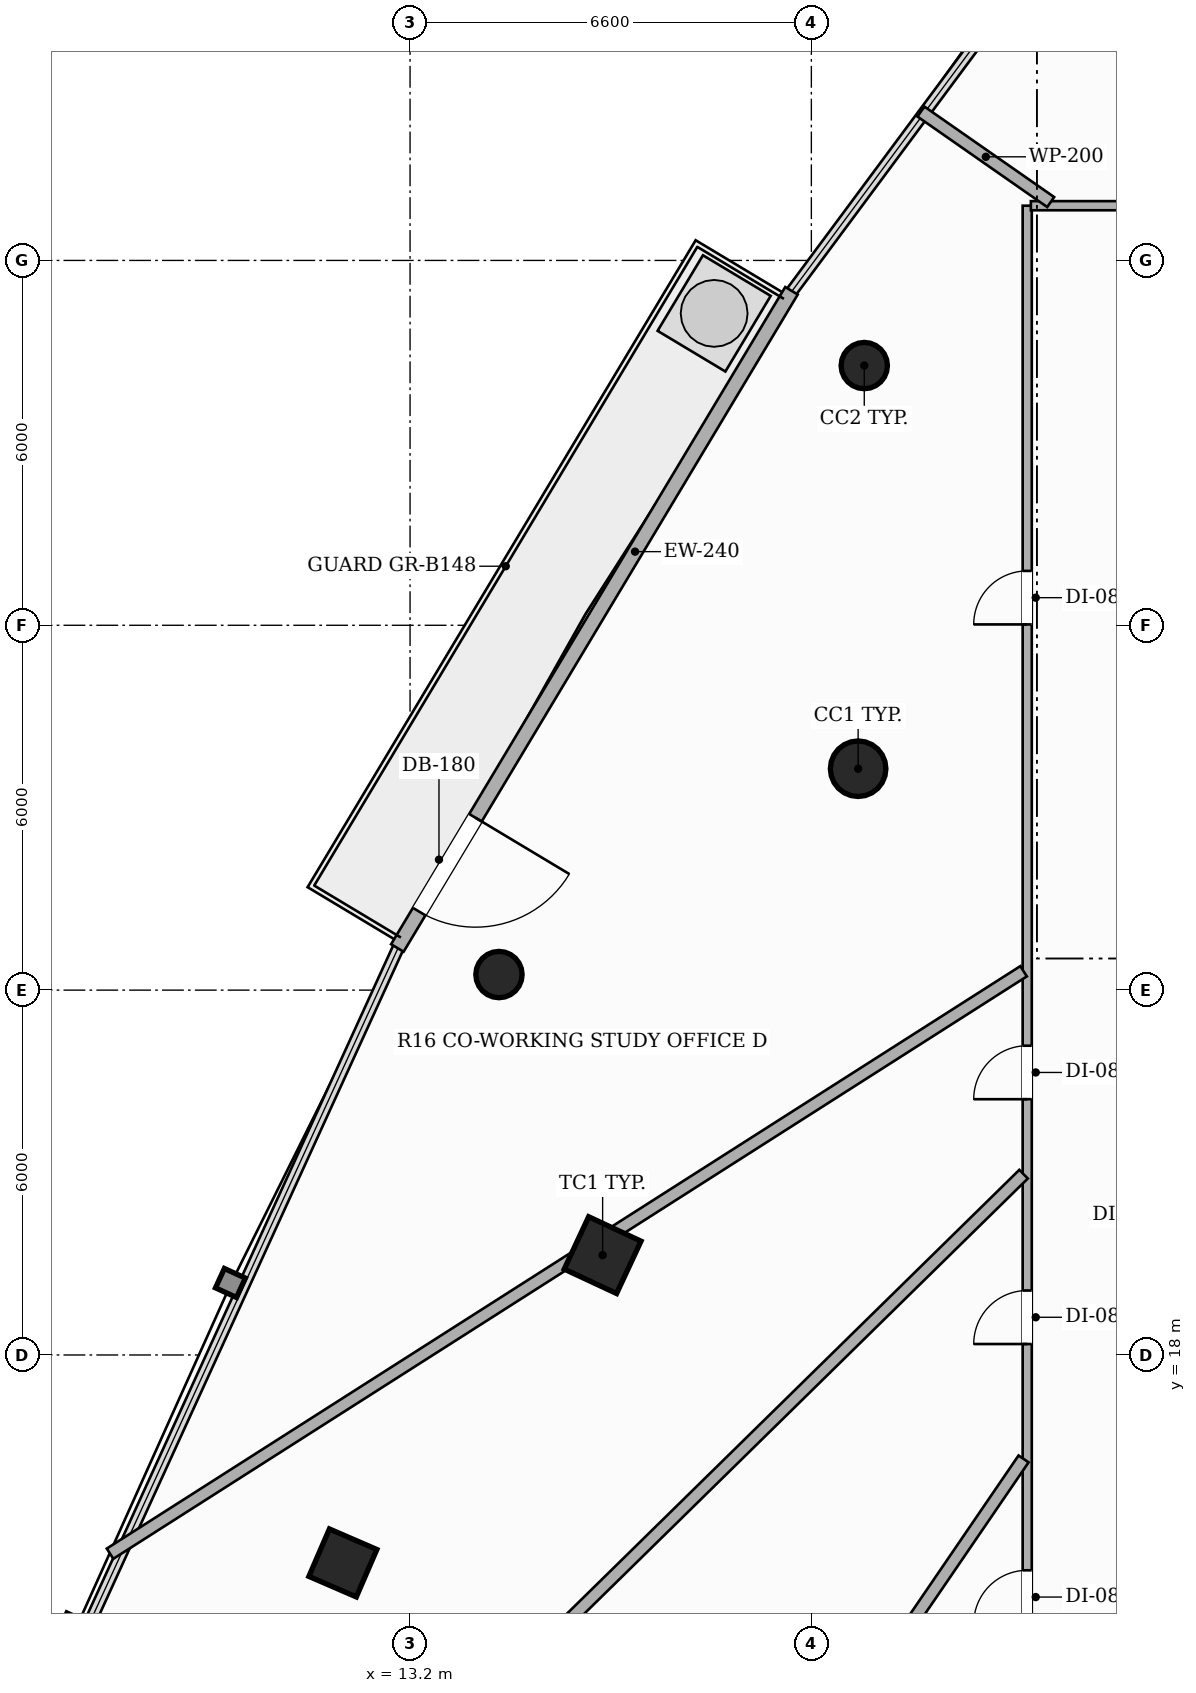
"""IFC4 building model, lengths in metres.
Left out: names, types, materials, properties, quantities, classifications, styles, units other than length and angle.
Written with IfcOpenShell. Run it as: python <this file> out.ifc"""

import sys

from ifc_helpers import new_model, si_unit, direction, frame, frame_2d, origin, origin_2d, place, context, subcontext, project, spatial, rectangle, hollow_rectangle, hollow_circle, extrude, element, fill, save


model = new_model("IFC4")
c1 = context("Model", 3, precision=1e-05, world=origin(), true_north=direction((0.0, 1.0)))
c2 = subcontext(c1, "Body", "Model", "MODEL_VIEW")
j1 = project(units=[si_unit("LENGTHUNIT", "METRE"), si_unit("PLANEANGLEUNIT", "RADIAN")], contexts=[c1])
p1 = place(None, origin())
s1 = spatial("IfcSite", under=j1, at=p1, CompositionType="ELEMENT")
p2 = place(p1, origin())
s2 = spatial("IfcBuilding", under=s1, at=p2, CompositionType="ELEMENT")
p3 = place(p2, frame((0.0, 0.0, 64.25)))
s3 = spatial("IfcBuildingStorey", under=s2, at=p3, CompositionType="ELEMENT", Elevation=64.25)
p4 = place(p3, frame((20.569, 27.641, 0.0), z_axis=(0.0, 0.0, 1.0), x_axis=(1.0, 0.0, 0.0)))
e1 = element("IfcColumn", 1, at=p4, inside=s3, PredefinedType="COLUMN", context=c2, shape_type="SweptSolid", body=[
    extrude(hollow_circle(Radius=0.457, WallThickness=0.025, at=origin_2d()), origin(), (0.0, 0.0, 1.0), 3.3),
])
p5 = place(p3, frame((16.367, 19.642, 0.0), z_axis=(0.0, 0.0, 1.0), x_axis=(0.422618261741, 0.906307787037, 0.0)))
e2 = element("IfcColumn", 2, at=p5, inside=s3, PredefinedType="COLUMN", context=c2, shape_type="SweptSolid", body=[
    extrude(hollow_rectangle(XDim=0.95, YDim=0.95, WallThickness=0.032, at=origin_2d()), origin(), (0.0, 0.0, 1.0), 3.3),
])
p6 = place(p3, frame((12.095, 14.58, 0.0), z_axis=(0.0, 0.0, 1.0), x_axis=(0.397147890635, 0.917754625684, 0.0)))
e3 = element("IfcColumn", 3, at=p6, inside=s3, PredefinedType="COLUMN", context=c2, shape_type="SweptSolid", body=[
    extrude(hollow_rectangle(XDim=0.85, YDim=0.85, WallThickness=0.028, at=origin_2d()), origin(), (0.0, 0.0, 1.0), 3.3),
])
for number, where, z_axis, x_axis in (
    (4, (20.67, 34.271, 0.0), (0.0, 0.0, 1.0), (1.0, 0.0, 0.0)),
    (5, (14.662, 24.256, 0.0), (0.0, 0.0, 1.0), (1.0, 0.0, 0.0)),
):
    element("IfcColumn", number, at=place(p3, frame(where, z_axis=z_axis, x_axis=x_axis)), inside=s3, PredefinedType="COLUMN", context=c2, shape_type="SweptSolid", body=[
        extrude(hollow_circle(Radius=0.381, WallThickness=0.022, at=origin_2d()), origin(), (0.0, 0.0, 1.0), 3.3),
    ])
p7 = place(p3, frame((19.473, 35.501, 0.0), z_axis=(0.0, 0.0, 1.0), x_axis=(-0.514333361126, -0.857590341382, 0.0)))
e6 = element("IfcWall", 6, at=p7, inside=s3, PredefinedType="SOLIDWALL", context=c2, shape_type="SweptSolid", body=[
    extrude(rectangle(XDim=12.603, YDim=0.24, at=frame_2d((6.301, 0.0))), origin(), (0.0, 0.0, 1.0), 2.624),
])
p8 = place(p7, frame((10.105, 0.0, 0.0)))
e7 = element("IfcOpeningElement", 7, at=p8, cuts=e6, PredefinedType="OPENING", context=c2, shape_type="SweptSolid", body=[
    extrude(rectangle(XDim=1.8, YDim=2.2, at=frame_2d((0.9, 1.1))), frame((0.0, 0.13, 0.0), z_axis=(0.0, -1.0, 0.0), x_axis=(1.0, 0.0, 0.0)), (0.0, 0.0, 1.0), 0.26),
])
p9 = place(p3, frame((23.35, 11.86, 0.0), z_axis=(0.0, 0.0, 1.0), x_axis=(0.0, 1.0, 0.0)))
e8 = element("IfcWall", 8, at=p9, inside=s3, PredefinedType="PARTITIONING", context=c2, shape_type="SweptSolid", body=[
    extrude(rectangle(XDim=25.04, YDim=0.15, at=frame_2d((12.52, 0.0))), origin(), (0.0, 0.0, 1.0), 2.413),
])
p10 = place(p9, frame((18.154, 0.0, 0.0)))
e9 = element("IfcOpeningElement", 9, at=p10, cuts=e8, PredefinedType="OPENING", context=c2, shape_type="SweptSolid", body=[
    extrude(rectangle(XDim=0.88, YDim=2.1, at=frame_2d((0.44, 1.05))), frame((0.0, 0.085, 0.0), z_axis=(0.0, -1.0, 0.0), x_axis=(1.0, 0.0, 0.0)), (0.0, 0.0, 1.0), 0.17),
])
p11 = place(p9, frame((10.346, 0.0, 0.0)))
e10 = element("IfcOpeningElement", 10, at=p11, cuts=e8, PredefinedType="OPENING", context=c2, shape_type="SweptSolid", body=[
    extrude(rectangle(XDim=0.88, YDim=2.1, at=frame_2d((0.44, 1.05))), frame((0.0, 0.085, 0.0), z_axis=(0.0, -1.0, 0.0), x_axis=(1.0, 0.0, 0.0)), (0.0, 0.0, 1.0), 0.17),
])
p12 = place(p9, frame((6.32, 0.0, 0.0)))
e11 = element("IfcOpeningElement", 11, at=p12, cuts=e8, PredefinedType="OPENING", context=c2, shape_type="SweptSolid", body=[
    extrude(rectangle(XDim=0.88, YDim=2.1, at=frame_2d((0.44, 1.05))), frame((0.0, 0.085, 0.0), z_axis=(0.0, -1.0, 0.0), x_axis=(1.0, 0.0, 0.0)), (0.0, 0.0, 1.0), 0.17),
])
p13 = place(p9, frame((1.719, 0.0, 0.0)))
e12 = element("IfcOpeningElement", 12, at=p13, cuts=e8, PredefinedType="OPENING", context=c2, shape_type="SweptSolid", body=[
    extrude(rectangle(XDim=0.88, YDim=2.1, at=frame_2d((0.44, 1.05))), frame((0.0, 0.085, 0.0), z_axis=(0.0, -1.0, 0.0), x_axis=(1.0, 0.0, 0.0)), (0.0, 0.0, 1.0), 0.17),
])
p14 = place(p3, frame((23.41, 36.9, 0.0), z_axis=(0.0, 0.0, 1.0), x_axis=(1.0, 0.0, 0.0)))
e13 = element("IfcWall", 13, at=p14, inside=s3, PredefinedType="PARTITIONING", context=c2, shape_type="SweptSolid", body=[
    extrude(rectangle(XDim=2.49, YDim=0.15, at=frame_2d((1.245, 0.0))), origin(), (0.0, 0.0, 1.0), 2.413),
])
p15 = place(p3, frame((23.736, 36.96, 0.0), z_axis=(0.0, 0.0, 1.0), x_axis=(-0.820275422115, 0.571968733302, 0.0)))
e14 = element("IfcWall", 14, at=p15, inside=s3, PredefinedType="PARTITIONING", context=c2, shape_type="SweptSolid", body=[
    extrude(rectangle(XDim=2.602, YDim=0.2, at=frame_2d((1.301, 0.0))), origin(), (0.0, 0.0, 1.0), 3.06),
])
p16 = place(p3, frame((23.29, 24.31, 0.0), z_axis=(0.0, 0.0, 1.0), x_axis=(-0.843217726059, -0.537572196509, 0.0)))
e15 = element("IfcWall", 15, at=p16, inside=s3, PredefinedType="PARTITIONING", context=c2, shape_type="SweptSolid", body=[
    extrude(rectangle(XDim=17.817, YDim=0.2, at=frame_2d((8.909, 0.0))), origin(), (0.0, 0.0, 1.0), 2.413),
])
p17 = place(p3, frame((23.29, 20.973, 0.0), z_axis=(0.0, 0.0, 1.0), x_axis=(-0.713831483248, -0.70031750908, 0.0)))
e16 = element("IfcWall", 16, at=p17, inside=s3, PredefinedType="PARTITIONING", context=c2, shape_type="SweptSolid", body=[
    extrude(rectangle(XDim=23.612, YDim=0.2, at=frame_2d((11.806, 0.0))), origin(), (0.0, 0.0, 1.0), 2.413),
])
p18 = place(p3, frame((23.29, 16.291, 0.0), z_axis=(0.0, 0.0, 1.0), x_axis=(-0.564210182678, -0.825631194761, 0.0)))
e17 = element("IfcWall", 17, at=p18, inside=s3, PredefinedType="PARTITIONING", context=c2, shape_type="SweptSolid", body=[
    extrude(rectangle(XDim=15.928, YDim=0.2, at=frame_2d((7.964, 0.0))), origin(), (0.0, 0.0, 1.0), 2.413),
])
p19 = place(p8, origin())
e18 = element("IfcDoor", 18, at=p19, inside=s3, OperationType="SINGLE_SWING_LEFT", PredefinedType="DOOR", context=c2, shape_type="SweptSolid", body=[
    extrude(rectangle(XDim=1.8, YDim=2.2, at=frame_2d((0.9, 1.1))), frame((0.0, 0.025, 0.0), z_axis=(0.0, -1.0, 0.0), x_axis=(1.0, 0.0, 0.0)), (0.0, 0.0, 1.0), 0.05),
])
fill(e7, e18)
p20 = place(p10, origin())
e19 = element("IfcDoor", 19, at=p20, inside=s3, OperationType="SINGLE_SWING_LEFT", PredefinedType="DOOR", context=c2, shape_type="SweptSolid", body=[
    extrude(rectangle(XDim=0.88, YDim=2.1, at=frame_2d((0.44, 1.05))), frame((0.0, 0.025, 0.0), z_axis=(0.0, -1.0, 0.0), x_axis=(1.0, 0.0, 0.0)), (0.0, 0.0, 1.0), 0.05),
])
fill(e9, e19)
p21 = place(p11, origin())
e20 = element("IfcDoor", 20, at=p21, inside=s3, OperationType="SINGLE_SWING_LEFT", PredefinedType="DOOR", context=c2, shape_type="SweptSolid", body=[
    extrude(rectangle(XDim=0.88, YDim=2.1, at=frame_2d((0.44, 1.05))), frame((0.0, 0.025, 0.0), z_axis=(0.0, -1.0, 0.0), x_axis=(1.0, 0.0, 0.0)), (0.0, 0.0, 1.0), 0.05),
])
fill(e10, e20)
p22 = place(p12, origin())
e21 = element("IfcDoor", 21, at=p22, inside=s3, OperationType="SINGLE_SWING_LEFT", PredefinedType="DOOR", context=c2, shape_type="SweptSolid", body=[
    extrude(rectangle(XDim=0.88, YDim=2.1, at=frame_2d((0.44, 1.05))), frame((0.0, 0.025, 0.0), z_axis=(0.0, -1.0, 0.0), x_axis=(1.0, 0.0, 0.0)), (0.0, 0.0, 1.0), 0.05),
])
fill(e11, e21)
p23 = place(p13, origin())
e22 = element("IfcDoor", 22, at=p23, inside=s3, OperationType="SINGLE_SWING_LEFT", PredefinedType="DOOR", context=c2, shape_type="SweptSolid", body=[
    extrude(rectangle(XDim=0.88, YDim=2.1, at=frame_2d((0.44, 1.05))), frame((0.0, 0.025, 0.0), z_axis=(0.0, -1.0, 0.0), x_axis=(1.0, 0.0, 0.0)), (0.0, 0.0, 1.0), 0.05),
])
fill(e12, e22)
save(model, sys.argv[1])
